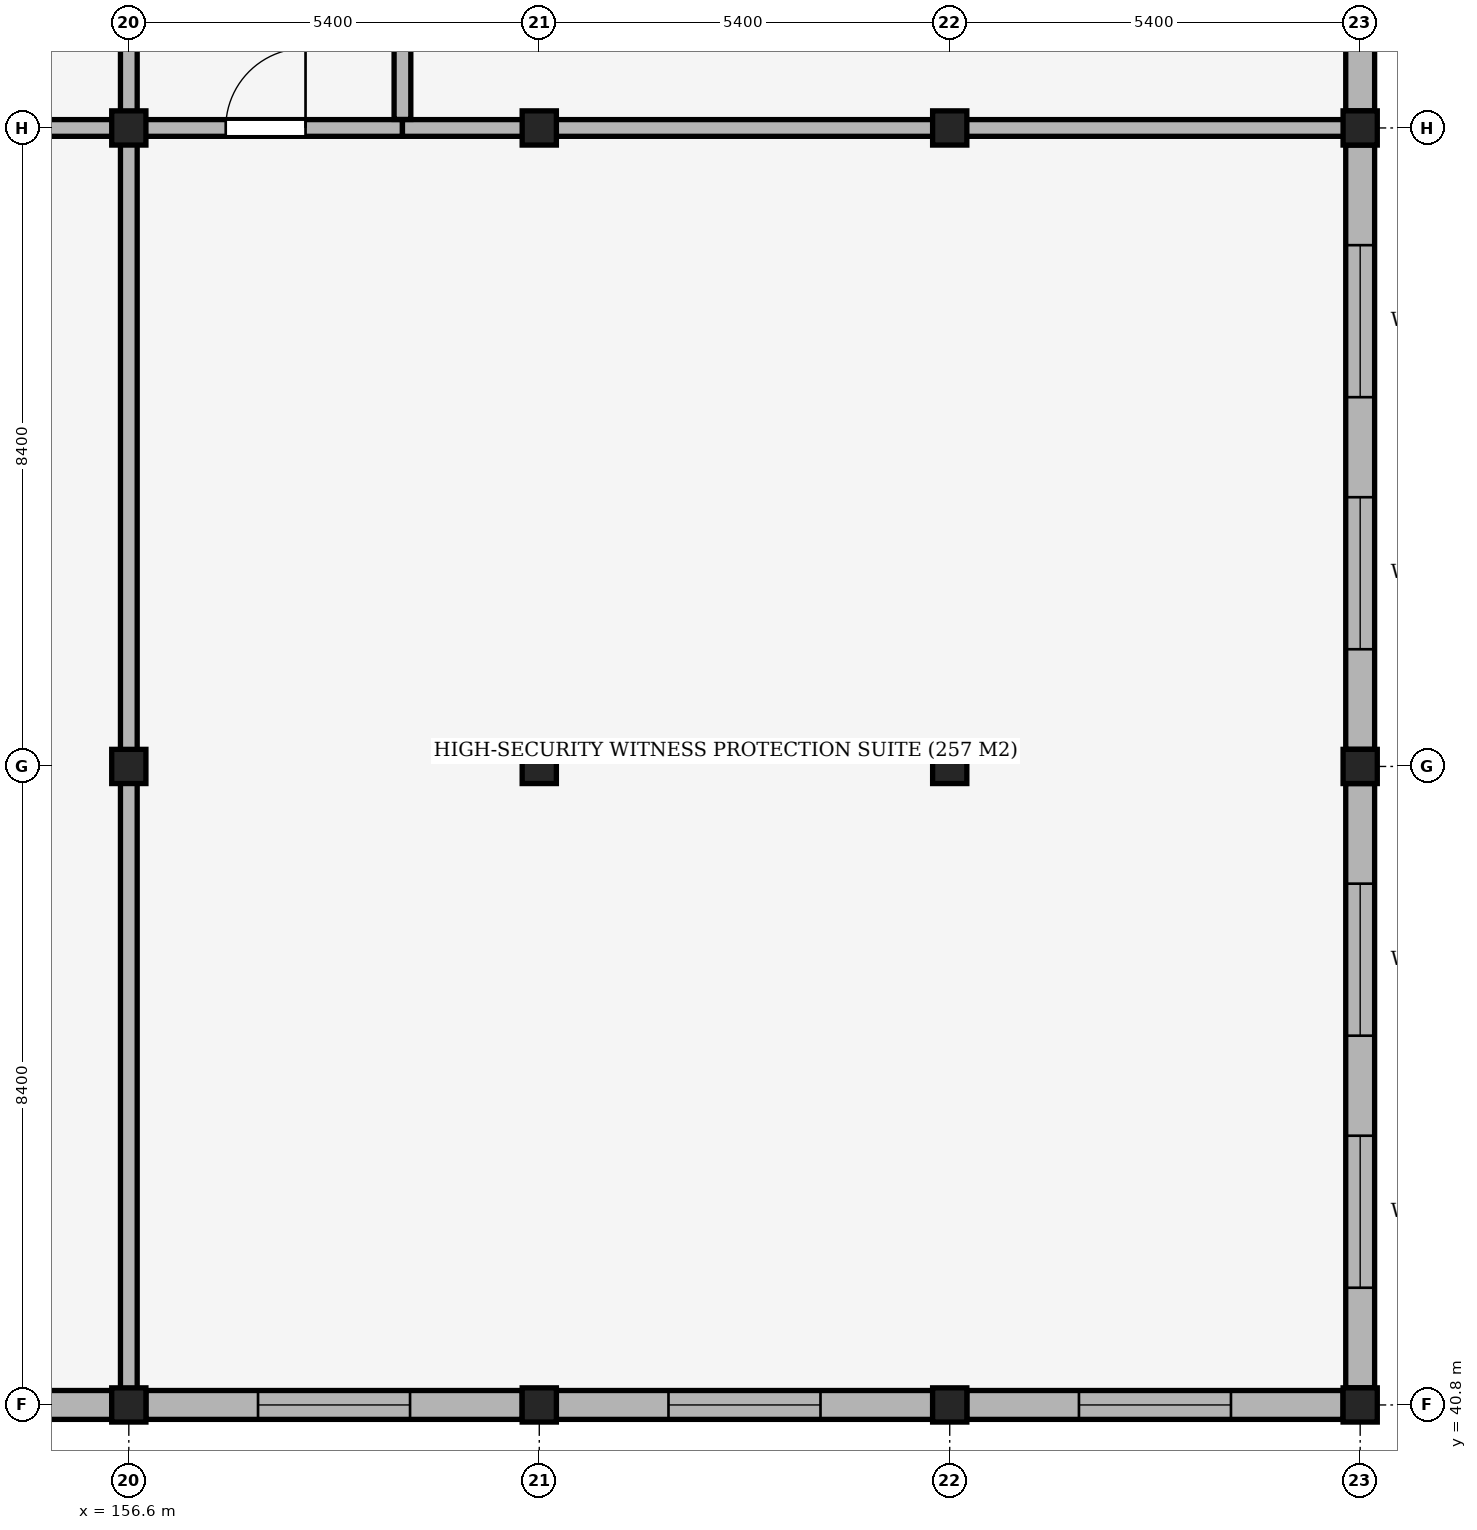
"""IFC4 building model, lengths in metres.
Left out: names, types, materials, properties, quantities, classifications, styles, units other than length and angle.
Written with IfcOpenShell. Run it as: python <this file> out.ifc"""

import sys

from ifc_helpers import new_model, si_unit, direction, frame, frame_2d, origin, origin_2d, place, context, subcontext, project, spatial, rectangle, extrude, element, fill, save


model = new_model("IFC4")
c1 = context("Model", 3, precision=1e-05, world=origin(), true_north=direction((0.0, 1.0)))
c2 = subcontext(c1, "Body", "Model", "MODEL_VIEW")
j1 = project(units=[si_unit("LENGTHUNIT", "METRE"), si_unit("PLANEANGLEUNIT", "RADIAN")], contexts=[c1])
p1 = place(None, origin())
s1 = spatial("IfcSite", under=j1, at=p1, CompositionType="ELEMENT")
p2 = place(p1, origin())
s2 = spatial("IfcBuilding", under=s1, at=p2, CompositionType="ELEMENT")
p3 = place(p2, origin())
s3 = spatial("IfcBuildingStorey", under=s2, at=p3, CompositionType="ELEMENT", Elevation=0.0)
for number, where, z_axis, x_axis in (
    (1, (156.6, 40.8, 0.0), (0.0, 0.0, 1.0), (1.0, 0.0, 0.0)),
    (2, (156.6, 49.2, 0.0), (0.0, 0.0, 1.0), (1.0, 0.0, 0.0)),
    (3, (156.6, 57.6, 0.0), (0.0, 0.0, 1.0), (1.0, 0.0, 0.0)),
    (4, (162.0, 40.8, 0.0), (0.0, 0.0, 1.0), (1.0, 0.0, 0.0)),
    (5, (162.0, 49.2, 0.0), (0.0, 0.0, 1.0), (1.0, 0.0, 0.0)),
    (6, (162.0, 57.6, 0.0), (0.0, 0.0, 1.0), (1.0, 0.0, 0.0)),
    (7, (167.4, 40.8, 0.0), (0.0, 0.0, 1.0), (1.0, 0.0, 0.0)),
    (8, (167.4, 49.2, 0.0), (0.0, 0.0, 1.0), (1.0, 0.0, 0.0)),
    (9, (167.4, 57.6, 0.0), (0.0, 0.0, 1.0), (1.0, 0.0, 0.0)),
    (10, (172.8, 40.8, 0.0), (0.0, 0.0, 1.0), (1.0, 0.0, 0.0)),
    (11, (172.8, 49.2, 0.0), (0.0, 0.0, 1.0), (1.0, 0.0, 0.0)),
    (12, (172.8, 57.6, 0.0), (0.0, 0.0, 1.0), (1.0, 0.0, 0.0)),
):
    element("IfcColumn", number, at=place(p3, frame(where, z_axis=z_axis, x_axis=x_axis)), inside=s3, PredefinedType="COLUMN", context=c2, shape_type="SweptSolid", body=[
        extrude(rectangle(XDim=0.45, YDim=0.45, at=origin_2d()), origin(), (0.0, 0.0, 1.0), 5.1),
    ])
p4 = place(p3, frame((172.8, 65.775, 0.0), z_axis=(0.0, 0.0, 1.0), x_axis=(0.0, -1.0, 0.0)))
e13 = element("IfcWall", 13, at=p4, inside=s3, PredefinedType="SOLIDWALL", context=c2, shape_type="SweptSolid", body=[
    extrude(rectangle(XDim=7.95, YDim=0.38, at=frame_2d((3.975, 0.0))), origin(), (0.0, 0.0, 1.0), 4.02),
])
p5 = place(p4, frame((1.317, 0.0, 2.1)))
e14 = element("IfcOpeningElement", 14, at=p5, cuts=e13, PredefinedType="OPENING", context=c2, shape_type="SweptSolid", body=[
    extrude(rectangle(XDim=2.0, YDim=1.2, at=frame_2d((1.0, 0.6))), frame((0.0, 0.205, 0.0), z_axis=(0.0, -1.0, 0.0), x_axis=(1.0, 0.0, 0.0)), (0.0, 0.0, 1.0), 0.41),
])
p6 = place(p4, frame((4.633, 0.0, 2.1)))
e15 = element("IfcOpeningElement", 15, at=p6, cuts=e13, PredefinedType="OPENING", context=c2, shape_type="SweptSolid", body=[
    extrude(rectangle(XDim=2.0, YDim=1.2, at=frame_2d((1.0, 0.6))), frame((0.0, 0.205, 0.0), z_axis=(0.0, -1.0, 0.0), x_axis=(1.0, 0.0, 0.0)), (0.0, 0.0, 1.0), 0.41),
])
p7 = place(p3, frame((172.8, 57.375, 0.0), z_axis=(0.0, 0.0, 1.0), x_axis=(0.0, -1.0, 0.0)))
e16 = element("IfcWall", 16, at=p7, inside=s3, PredefinedType="SOLIDWALL", context=c2, shape_type="SweptSolid", body=[
    extrude(rectangle(XDim=7.95, YDim=0.38, at=frame_2d((3.975, 0.0))), origin(), (0.0, 0.0, 1.0), 4.02),
])
p8 = place(p7, frame((1.317, 0.0, 2.1)))
e17 = element("IfcOpeningElement", 17, at=p8, cuts=e16, PredefinedType="OPENING", context=c2, shape_type="SweptSolid", body=[
    extrude(rectangle(XDim=2.0, YDim=1.2, at=frame_2d((1.0, 0.6))), frame((0.0, 0.205, 0.0), z_axis=(0.0, -1.0, 0.0), x_axis=(1.0, 0.0, 0.0)), (0.0, 0.0, 1.0), 0.41),
])
p9 = place(p7, frame((4.633, 0.0, 2.1)))
e18 = element("IfcOpeningElement", 18, at=p9, cuts=e16, PredefinedType="OPENING", context=c2, shape_type="SweptSolid", body=[
    extrude(rectangle(XDim=2.0, YDim=1.2, at=frame_2d((1.0, 0.6))), frame((0.0, 0.205, 0.0), z_axis=(0.0, -1.0, 0.0), x_axis=(1.0, 0.0, 0.0)), (0.0, 0.0, 1.0), 0.41),
])
p10 = place(p3, frame((172.8, 48.975, 0.0), z_axis=(0.0, 0.0, 1.0), x_axis=(0.0, -1.0, 0.0)))
e19 = element("IfcWall", 19, at=p10, inside=s3, PredefinedType="SOLIDWALL", context=c2, shape_type="SweptSolid", body=[
    extrude(rectangle(XDim=7.95, YDim=0.38, at=frame_2d((3.975, 0.0))), origin(), (0.0, 0.0, 1.0), 4.02),
])
p11 = place(p10, frame((1.317, 0.0, 2.1)))
e20 = element("IfcOpeningElement", 20, at=p11, cuts=e19, PredefinedType="OPENING", context=c2, shape_type="SweptSolid", body=[
    extrude(rectangle(XDim=2.0, YDim=1.2, at=frame_2d((1.0, 0.6))), frame((0.0, 0.205, 0.0), z_axis=(0.0, -1.0, 0.0), x_axis=(1.0, 0.0, 0.0)), (0.0, 0.0, 1.0), 0.41),
])
p12 = place(p10, frame((4.633, 0.0, 2.1)))
e21 = element("IfcOpeningElement", 21, at=p12, cuts=e19, PredefinedType="OPENING", context=c2, shape_type="SweptSolid", body=[
    extrude(rectangle(XDim=2.0, YDim=1.2, at=frame_2d((1.0, 0.6))), frame((0.0, 0.205, 0.0), z_axis=(0.0, -1.0, 0.0), x_axis=(1.0, 0.0, 0.0)), (0.0, 0.0, 1.0), 0.41),
])
p13 = place(p3, frame((172.575, 40.8, 0.0), z_axis=(0.0, 0.0, 1.0), x_axis=(-1.0, 0.0, 0.0)))
e22 = element("IfcWall", 22, at=p13, inside=s3, PredefinedType="SOLIDWALL", context=c2, shape_type="SweptSolid", body=[
    extrude(rectangle(XDim=4.95, YDim=0.38, at=frame_2d((2.475, 0.0))), origin(), (0.0, 0.0, 1.0), 4.22),
])
p14 = place(p13, frame((1.475, 0.0, 2.1)))
e23 = element("IfcOpeningElement", 23, at=p14, cuts=e22, PredefinedType="OPENING", context=c2, shape_type="SweptSolid", body=[
    extrude(rectangle(XDim=2.0, YDim=1.2, at=frame_2d((1.0, 0.6))), frame((0.0, 0.205, 0.0), z_axis=(0.0, -1.0, 0.0), x_axis=(1.0, 0.0, 0.0)), (0.0, 0.0, 1.0), 0.41),
])
p15 = place(p3, frame((167.175, 40.8, 0.0), z_axis=(0.0, 0.0, 1.0), x_axis=(-1.0, 0.0, 0.0)))
e24 = element("IfcWall", 24, at=p15, inside=s3, PredefinedType="SOLIDWALL", context=c2, shape_type="SweptSolid", body=[
    extrude(rectangle(XDim=4.95, YDim=0.38, at=frame_2d((2.475, 0.0))), origin(), (0.0, 0.0, 1.0), 4.22),
])
p16 = place(p15, frame((1.475, 0.0, 2.1)))
e25 = element("IfcOpeningElement", 25, at=p16, cuts=e24, PredefinedType="OPENING", context=c2, shape_type="SweptSolid", body=[
    extrude(rectangle(XDim=2.0, YDim=1.2, at=frame_2d((1.0, 0.6))), frame((0.0, 0.205, 0.0), z_axis=(0.0, -1.0, 0.0), x_axis=(1.0, 0.0, 0.0)), (0.0, 0.0, 1.0), 0.41),
])
p17 = place(p3, frame((161.775, 40.8, 0.0), z_axis=(0.0, 0.0, 1.0), x_axis=(-1.0, 0.0, 0.0)))
e26 = element("IfcWall", 26, at=p17, inside=s3, PredefinedType="SOLIDWALL", context=c2, shape_type="SweptSolid", body=[
    extrude(rectangle(XDim=4.95, YDim=0.38, at=frame_2d((2.475, 0.0))), origin(), (0.0, 0.0, 1.0), 4.22),
])
p18 = place(p17, frame((1.475, 0.0, 2.1)))
e27 = element("IfcOpeningElement", 27, at=p18, cuts=e26, PredefinedType="OPENING", context=c2, shape_type="SweptSolid", body=[
    extrude(rectangle(XDim=2.0, YDim=1.2, at=frame_2d((1.0, 0.6))), frame((0.0, 0.205, 0.0), z_axis=(0.0, -1.0, 0.0), x_axis=(1.0, 0.0, 0.0)), (0.0, 0.0, 1.0), 0.41),
])
p19 = place(p3, frame((156.375, 40.8, 0.0), z_axis=(0.0, 0.0, 1.0), x_axis=(-1.0, 0.0, 0.0)))
e28 = element("IfcWall", 28, at=p19, inside=s3, PredefinedType="SOLIDWALL", context=c2, shape_type="SweptSolid", body=[
    extrude(rectangle(XDim=4.95, YDim=0.38, at=frame_2d((2.475, 0.0))), origin(), (0.0, 0.0, 1.0), 4.07),
])
p20 = place(p19, frame((1.475, 0.0, 2.1)))
e29 = element("IfcOpeningElement", 29, at=p20, cuts=e28, PredefinedType="OPENING", context=c2, shape_type="SweptSolid", body=[
    extrude(rectangle(XDim=2.0, YDim=1.2, at=frame_2d((1.0, 0.6))), frame((0.0, 0.205, 0.0), z_axis=(0.0, -1.0, 0.0), x_axis=(1.0, 0.0, 0.0)), (0.0, 0.0, 1.0), 0.41),
])
p21 = place(p3, frame((138.4, 57.6, 0.0), z_axis=(0.0, 0.0, 1.0), x_axis=(1.0, 0.0, 0.0)))
e30 = element("IfcWall", 30, at=p21, inside=s3, PredefinedType="PARTITIONING", context=c2, shape_type="SweptSolid", body=[
    extrude(rectangle(XDim=18.2, YDim=0.22, at=frame_2d((9.1, 0.0))), origin(), (0.0, 0.0, 1.0), 4.02),
])
p22 = place(p3, frame((156.6, 57.6, 0.0), z_axis=(0.0, 0.0, 1.0), x_axis=(1.0, 0.0, 0.0)))
e31 = element("IfcWall", 31, at=p22, inside=s3, PredefinedType="PARTITIONING", context=c2, shape_type="SweptSolid", body=[
    extrude(rectangle(XDim=3.6, YDim=0.22, at=frame_2d((1.8, 0.0))), origin(), (0.0, 0.0, 1.0), 4.02),
])
p23 = place(p22, frame((1.275, 0.0, 0.0)))
e32 = element("IfcOpeningElement", 32, at=p23, cuts=e31, PredefinedType="OPENING", context=c2, shape_type="SweptSolid", body=[
    extrude(rectangle(XDim=1.05, YDim=2.15, at=frame_2d((0.525, 1.075))), frame((0.0, 0.125, 0.0), z_axis=(0.0, -1.0, 0.0), x_axis=(1.0, 0.0, 0.0)), (0.0, 0.0, 1.0), 0.25),
])
p24 = place(p3, frame((160.2, 57.6, 0.0), z_axis=(0.0, 0.0, 1.0), x_axis=(1.0, 0.0, 0.0)))
e33 = element("IfcWall", 33, at=p24, inside=s3, PredefinedType="PARTITIONING", context=c2, shape_type="SweptSolid", body=[
    extrude(rectangle(XDim=12.541, YDim=0.22, at=frame_2d((6.271, 0.0))), origin(), (0.0, 0.0, 1.0), 4.02),
])
p25 = place(p3, frame((156.6, 40.853, 0.0), z_axis=(0.0, 0.0, 1.0), x_axis=(0.0, 1.0, 0.0)))
e34 = element("IfcWall", 34, at=p25, inside=s3, PredefinedType="PARTITIONING", context=c2, shape_type="SweptSolid", body=[
    extrude(rectangle(XDim=16.635, YDim=0.22, at=frame_2d((8.317, 0.0))), origin(), (0.0, 0.0, 1.0), 4.02),
])
p26 = place(p3, frame((156.6, 57.712, 0.0), z_axis=(0.0, 0.0, 1.0), x_axis=(0.0, 1.0, 0.0)))
e35 = element("IfcWall", 35, at=p26, inside=s3, PredefinedType="PARTITIONING", context=c2, shape_type="SweptSolid", body=[
    extrude(rectangle(XDim=13.276, YDim=0.22, at=frame_2d((6.638, 0.0))), origin(), (0.0, 0.0, 1.0), 4.02),
])
p27 = place(p3, frame((160.2, 57.712, 0.0), z_axis=(0.0, 0.0, 1.0), x_axis=(0.0, 1.0, 0.0)))
e36 = element("IfcWall", 36, at=p27, inside=s3, PredefinedType="PARTITIONING", context=c2, shape_type="SweptSolid", body=[
    extrude(rectangle(XDim=11.416, YDim=0.22, at=frame_2d((5.708, 0.0))), origin(), (0.0, 0.0, 1.0), 4.22),
])
p28 = place(p27, frame((5.183, 0.0, 0.0)))
e37 = element("IfcOpeningElement", 37, at=p28, cuts=e36, PredefinedType="OPENING", context=c2, shape_type="SweptSolid", body=[
    extrude(rectangle(XDim=1.05, YDim=2.1, at=frame_2d((0.525, 1.05))), frame((0.0, 0.125, 0.0), z_axis=(0.0, -1.0, 0.0), x_axis=(1.0, 0.0, 0.0)), (0.0, 0.0, 1.0), 0.25),
])
p29 = place(p8, origin())
e38 = element("IfcWindow", 38, at=p29, inside=s3, PartitioningType="SINGLE_PANEL", PredefinedType="WINDOW", context=c2, shape_type="SweptSolid", body=[
    extrude(rectangle(XDim=2.0, YDim=1.2, at=frame_2d((1.0, 0.6))), frame((0.0, 0.03, 0.0), z_axis=(0.0, -1.0, 0.0), x_axis=(1.0, 0.0, 0.0)), (0.0, 0.0, 1.0), 0.06),
])
fill(e17, e38)
p30 = place(p9, origin())
e39 = element("IfcWindow", 39, at=p30, inside=s3, PartitioningType="SINGLE_PANEL", PredefinedType="WINDOW", context=c2, shape_type="SweptSolid", body=[
    extrude(rectangle(XDim=2.0, YDim=1.2, at=frame_2d((1.0, 0.6))), frame((0.0, 0.03, 0.0), z_axis=(0.0, -1.0, 0.0), x_axis=(1.0, 0.0, 0.0)), (0.0, 0.0, 1.0), 0.06),
])
fill(e18, e39)
p31 = place(p11, origin())
e40 = element("IfcWindow", 40, at=p31, inside=s3, PartitioningType="SINGLE_PANEL", PredefinedType="WINDOW", context=c2, shape_type="SweptSolid", body=[
    extrude(rectangle(XDim=2.0, YDim=1.2, at=frame_2d((1.0, 0.6))), frame((0.0, 0.03, 0.0), z_axis=(0.0, -1.0, 0.0), x_axis=(1.0, 0.0, 0.0)), (0.0, 0.0, 1.0), 0.06),
])
fill(e20, e40)
p32 = place(p12, origin())
e41 = element("IfcWindow", 41, at=p32, inside=s3, PartitioningType="SINGLE_PANEL", PredefinedType="WINDOW", context=c2, shape_type="SweptSolid", body=[
    extrude(rectangle(XDim=2.0, YDim=1.2, at=frame_2d((1.0, 0.6))), frame((0.0, 0.03, 0.0), z_axis=(0.0, -1.0, 0.0), x_axis=(1.0, 0.0, 0.0)), (0.0, 0.0, 1.0), 0.06),
])
fill(e21, e41)
p33 = place(p14, origin())
e42 = element("IfcWindow", 42, at=p33, inside=s3, PartitioningType="SINGLE_PANEL", PredefinedType="WINDOW", context=c2, shape_type="SweptSolid", body=[
    extrude(rectangle(XDim=2.0, YDim=1.2, at=frame_2d((1.0, 0.6))), frame((0.0, 0.03, 0.0), z_axis=(0.0, -1.0, 0.0), x_axis=(1.0, 0.0, 0.0)), (0.0, 0.0, 1.0), 0.06),
])
fill(e23, e42)
p34 = place(p16, origin())
e43 = element("IfcWindow", 43, at=p34, inside=s3, PartitioningType="SINGLE_PANEL", PredefinedType="WINDOW", context=c2, shape_type="SweptSolid", body=[
    extrude(rectangle(XDim=2.0, YDim=1.2, at=frame_2d((1.0, 0.6))), frame((0.0, 0.03, 0.0), z_axis=(0.0, -1.0, 0.0), x_axis=(1.0, 0.0, 0.0)), (0.0, 0.0, 1.0), 0.06),
])
fill(e25, e43)
p35 = place(p18, origin())
e44 = element("IfcWindow", 44, at=p35, inside=s3, PartitioningType="SINGLE_PANEL", PredefinedType="WINDOW", context=c2, shape_type="SweptSolid", body=[
    extrude(rectangle(XDim=2.0, YDim=1.2, at=frame_2d((1.0, 0.6))), frame((0.0, 0.03, 0.0), z_axis=(0.0, -1.0, 0.0), x_axis=(1.0, 0.0, 0.0)), (0.0, 0.0, 1.0), 0.06),
])
fill(e27, e44)
p36 = place(p23, origin())
e45 = element("IfcDoor", 45, at=p36, inside=s3, OperationType="SINGLE_SWING_RIGHT", PredefinedType="DOOR", context=c2, shape_type="SweptSolid", body=[
    extrude(rectangle(XDim=1.05, YDim=2.15, at=frame_2d((0.525, 1.075))), frame((0.0, 0.025, 0.0), z_axis=(0.0, -1.0, 0.0), x_axis=(1.0, 0.0, 0.0)), (0.0, 0.0, 1.0), 0.05),
])
fill(e32, e45)
save(model, sys.argv[1])
